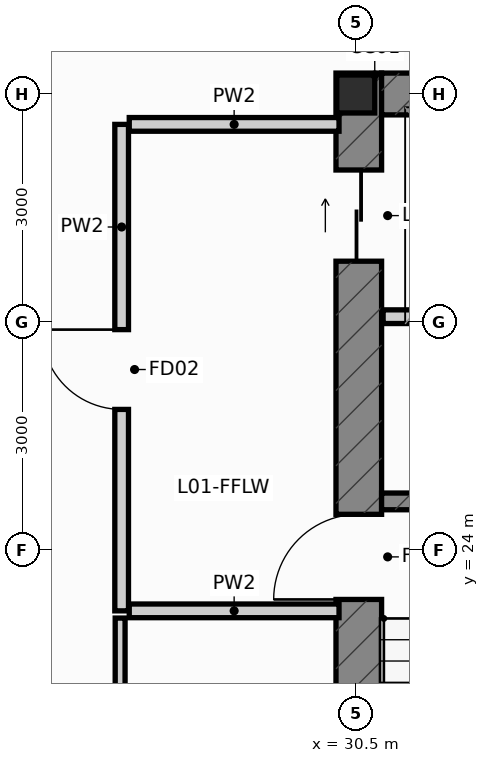
"""IFC4 building model, lengths in metres.
Left out: names, types, materials, properties, quantities, classifications, styles, units other than length and angle.
Written with IfcOpenShell. Run it as: python <this file> out.ifc"""

import sys

from ifc_helpers import new_model, si_unit, direction, frame, frame_2d, origin, origin_2d, place, context, subcontext, project, spatial, rectangle, i_section, extrude, source, transform, mapped, element, fill, save


model = new_model("IFC4")
c1 = context("Model", 3, precision=1e-05, world=origin(), true_north=direction((0.0, 1.0)))
c2 = subcontext(c1, "Body", "Model", "MODEL_VIEW")
j1 = project(units=[si_unit("LENGTHUNIT", "METRE"), si_unit("PLANEANGLEUNIT", "RADIAN")], contexts=[c1])
p1 = place(None, origin())
s1 = spatial("IfcSite", under=j1, at=p1, CompositionType="ELEMENT")
p2 = place(p1, origin())
s2 = spatial("IfcBuilding", under=s1, at=p2, CompositionType="ELEMENT")
p3 = place(p2, frame((0.0, 0.0, 5.4)))
s3 = spatial("IfcBuildingStorey", under=s2, at=p3, CompositionType="ELEMENT", Elevation=5.4)
m1 = source(origin(), c2, "Body", "SweptSolid", [
    extrude(i_section(OverallWidth=0.5, OverallDepth=0.5, WebThickness=0.028, FlangeThickness=0.04, at=origin_2d()), origin(), (0.0, 0.0, 1.0), 4.8),
])
p4 = place(p3, frame((30.5, 30.0, 0.0), z_axis=(0.0, 0.0, 1.0), x_axis=(1.0, 0.0, 0.0)))
e1 = element("IfcColumn", 1, at=p4, inside=s3, PredefinedType="COLUMN", context=c2, shape_type="MappedRepresentation", body=[
    mapped(m1, transform((0.0, 0.0, 0.0), scale=1.0)),
])
p5 = place(p3, frame((30.54, 16.85, 0.0), z_axis=(0.0, 0.0, 1.0), x_axis=(0.0, 1.0, 0.0)))
e2 = element("IfcWall", 2, at=p5, inside=s3, PredefinedType="SHEAR", context=c2, shape_type="SweptSolid", body=[
    extrude(rectangle(XDim=13.425, YDim=0.6, at=frame_2d((6.712, 0.0))), origin(), (0.0, 0.0, 1.0), 4.8),
])
p6 = place(p5, frame((6.5, 0.0, 0.0)))
e3 = element("IfcOpeningElement", 3, at=p6, cuts=e2, PredefinedType="OPENING", context=c2, shape_type="SweptSolid", body=[
    extrude(rectangle(XDim=1.12, YDim=2.15, at=frame_2d((0.56, 1.075))), frame((0.0, 0.312, 0.0), z_axis=(0.0, -1.0, 0.0), x_axis=(1.0, 0.0, 0.0)), (0.0, 0.0, 1.0), 0.624),
])
p7 = place(p5, frame((10.95, 0.0, 0.0)))
e4 = element("IfcOpeningElement", 4, at=p7, cuts=e2, PredefinedType="OPENING", context=c2, shape_type="SweptSolid", body=[
    extrude(rectangle(XDim=1.2, YDim=2.2, at=frame_2d((0.6, 1.1))), frame((0.0, 0.312, 0.0), z_axis=(0.0, -1.0, 0.0), x_axis=(1.0, 0.0, 0.0)), (0.0, 0.0, 1.0), 0.624),
])
p8 = place(p3, frame((30.84, 30.0, 0.0), z_axis=(0.0, 0.0, 1.0), x_axis=(1.0, 0.0, 0.0)))
e5 = element("IfcWall", 5, at=p8, inside=s3, PredefinedType="SHEAR", context=c2, shape_type="SweptSolid", body=[
    extrude(rectangle(XDim=2.9, YDim=0.55, at=frame_2d((1.45, 0.0))), origin(), (0.0, 0.0, 1.0), 4.8),
])
p9 = place(p3, frame((30.84, 24.64, 0.0), z_axis=(0.0, 0.0, 1.0), x_axis=(1.0, 0.0, 0.0)))
e6 = element("IfcWall", 6, at=p9, inside=s3, PredefinedType="SHEAR", context=c2, shape_type="SweptSolid", body=[
    extrude(rectangle(XDim=2.9, YDim=0.22, at=frame_2d((1.45, 0.0))), origin(), (0.0, 0.0, 1.0), 4.8),
])
p10 = place(p3, frame((27.42, 23.2, 0.0), z_axis=(0.0, 0.0, 1.0), x_axis=(0.0, 1.0, 0.0)))
e7 = element("IfcWall", 7, at=p10, inside=s3, PredefinedType="PARTITIONING", context=c2, shape_type="SweptSolid", body=[
    extrude(rectangle(XDim=6.4, YDim=0.18, at=frame_2d((3.2, 0.0))), origin(), (0.0, 0.0, 1.0), 4.106),
])
p11 = place(p10, frame((2.65, 0.0, 0.0)))
e8 = element("IfcOpeningElement", 8, at=p11, cuts=e7, PredefinedType="OPENING", context=c2, shape_type="SweptSolid", body=[
    extrude(rectangle(XDim=1.05, YDim=2.15, at=frame_2d((0.525, 1.075))), frame((0.0, 0.102, 0.0), z_axis=(0.0, -1.0, 0.0), x_axis=(1.0, 0.0, 0.0)), (0.0, 0.0, 1.0), 0.204),
])
p12 = place(p3, frame((27.52, 23.2, 0.0), z_axis=(0.0, 0.0, 1.0), x_axis=(1.0, 0.0, 0.0)))
e9 = element("IfcWall", 9, at=p12, inside=s3, PredefinedType="PARTITIONING", context=c2, shape_type="SweptSolid", body=[
    extrude(rectangle(XDim=2.76, YDim=0.18, at=frame_2d((1.38, 0.0))), origin(), (0.0, 0.0, 1.0), 4.48),
])
p13 = place(p3, frame((27.52, 29.6, 0.0), z_axis=(0.0, 0.0, 1.0), x_axis=(1.0, 0.0, 0.0)))
e10 = element("IfcWall", 10, at=p13, inside=s3, PredefinedType="PARTITIONING", context=c2, shape_type="SweptSolid", body=[
    extrude(rectangle(XDim=2.76, YDim=0.18, at=frame_2d((1.38, 0.0))), origin(), (0.0, 0.0, 1.0), 3.854),
])
p14 = place(p3, frame((30.86, 27.07, 0.0), z_axis=(0.0, 0.0, 1.0), x_axis=(1.0, 0.0, 0.0)))
e11 = element("IfcWall", 11, at=p14, inside=s3, PredefinedType="PARTITIONING", context=c2, shape_type="SweptSolid", body=[
    extrude(rectangle(XDim=2.9, YDim=0.18, at=frame_2d((1.45, 0.0))), origin(), (0.0, 0.0, 1.0), 4.48),
])
p15 = place(p3, frame((27.4, 14.355, 0.0), z_axis=(0.0, 0.0, 1.0), x_axis=(0.0, 1.0, 0.0)))
e12 = element("IfcWall", 12, at=p15, inside=s3, PredefinedType="PARTITIONING", context=c2, shape_type="SweptSolid", body=[
    extrude(rectangle(XDim=8.75, YDim=0.13, at=frame_2d((4.375, 0.0))), origin(), (0.0, 0.0, 1.0), 4.106),
])
p16 = place(p15, frame((3.895, 0.0, 0.0)))
e13 = element("IfcOpeningElement", 13, at=p16, cuts=e12, PredefinedType="OPENING", context=c2, shape_type="SweptSolid", body=[
    extrude(rectangle(XDim=0.96, YDim=2.15, at=frame_2d((0.48, 1.075))), frame((0.0, 0.077, 0.0), z_axis=(0.0, -1.0, 0.0), x_axis=(1.0, 0.0, 0.0)), (0.0, 0.0, 1.0), 0.154),
])
p17 = place(p6, origin())
e14 = element("IfcDoor", 14, at=p17, inside=s3, OperationType="SINGLE_SWING_LEFT", PredefinedType="DOOR", context=c2, shape_type="SweptSolid", body=[
    extrude(rectangle(XDim=1.12, YDim=2.15, at=frame_2d((0.56, 1.075))), frame((0.0, 0.025, 0.0), z_axis=(0.0, -1.0, 0.0), x_axis=(1.0, 0.0, 0.0)), (0.0, 0.0, 1.0), 0.05),
])
fill(e3, e14)
p18 = place(p7, origin())
e15 = element("IfcDoor", 15, at=p18, inside=s3, OperationType="SLIDING_TO_LEFT", PredefinedType="DOOR", context=c2, shape_type="SweptSolid", body=[
    extrude(rectangle(XDim=1.2, YDim=2.2, at=frame_2d((0.6, 1.1))), frame((0.0, 0.025, 0.0), z_axis=(0.0, -1.0, 0.0), x_axis=(1.0, 0.0, 0.0)), (0.0, 0.0, 1.0), 0.05),
])
fill(e4, e15)
p19 = place(p11, origin())
e16 = element("IfcDoor", 16, at=p19, inside=s3, OperationType="SINGLE_SWING_RIGHT", PredefinedType="DOOR", context=c2, shape_type="SweptSolid", body=[
    extrude(rectangle(XDim=1.05, YDim=2.15, at=frame_2d((0.525, 1.075))), frame((0.0, 0.025, 0.0), z_axis=(0.0, -1.0, 0.0), x_axis=(1.0, 0.0, 0.0)), (0.0, 0.0, 1.0), 0.05),
])
fill(e8, e16)
save(model, sys.argv[1])
